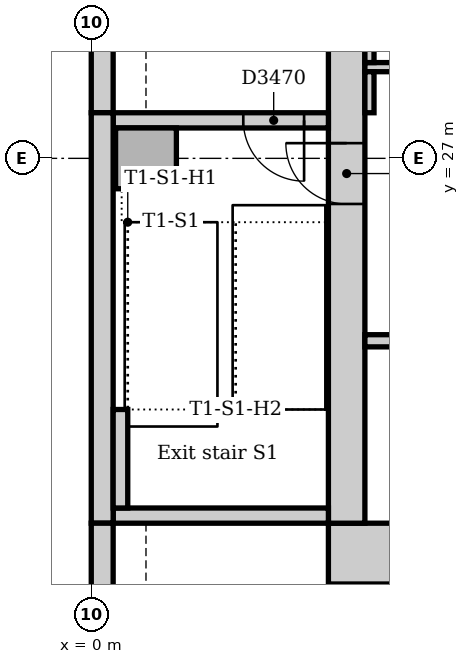
"""IFC4 building model, lengths in metres.
Left out: names, types, materials, properties, quantities, classifications, styles, units other than length and angle.
Written with IfcOpenShell. Run it as: python <this file> out.ifc"""

import sys

from ifc_helpers import new_model, si_unit, direction, frame, frame_2d, origin, origin_2d, place, context, subcontext, project, spatial, rectangle, extrude, element, fill, save


model = new_model("IFC4")
c1 = context("Model", 3, precision=1e-05, world=origin(), true_north=direction((0.0, 1.0)))
c2 = subcontext(c1, "Body", "Model", "MODEL_VIEW")
j1 = project(units=[si_unit("LENGTHUNIT", "METRE"), si_unit("PLANEANGLEUNIT", "RADIAN")], contexts=[c1])
p1 = place(None, origin())
s1 = spatial("IfcSite", under=j1, at=p1, CompositionType="ELEMENT")
p2 = place(p1, origin())
s2 = spatial("IfcBuilding", under=s1, at=p2, CompositionType="ELEMENT")
p3 = place(p2, frame((0.0, 0.0, 55.0)))
s3 = spatial("IfcBuildingStorey", under=s2, at=p3, CompositionType="ELEMENT", Elevation=55.0)
p4 = place(p3, frame((3.9, 20.5, 0.0), z_axis=(0.0, 0.0, 1.0), x_axis=(1.0, 0.0, 0.0)))
e1 = element("IfcWall", 1, at=p4, inside=s3, PredefinedType="SOLIDWALL", context=c2, shape_type="SweptSolid", body=[
    extrude(rectangle(XDim=19.6, YDim=1.0, at=frame_2d((9.8, 0.0))), origin(), (0.0, 0.0, 1.0), 4.0),
])
p5 = place(p3, frame((4.2, 31.5, 0.0), z_axis=(0.0, 0.0, 1.0), x_axis=(0.0, -1.0, 0.0)))
e2 = element("IfcWall", 2, at=p5, inside=s3, PredefinedType="SOLIDWALL", context=c2, shape_type="SweptSolid", body=[
    extrude(rectangle(XDim=10.5, YDim=0.6, at=frame_2d((5.25, 0.0))), origin(), (0.0, 0.0, 1.0), 4.0),
])
p6 = place(p5, frame((4.25, 0.0, 0.0)))
e3 = element("IfcOpeningElement", 3, at=p6, cuts=e2, PredefinedType="OPENING", context=c2, shape_type="SweptSolid", body=[
    extrude(rectangle(XDim=1.0, YDim=2.1, at=frame_2d((0.5, 1.05))), frame((0.0, 0.31, 0.0), z_axis=(0.0, -1.0, 0.0), x_axis=(1.0, 0.0, 0.0)), (0.0, 0.0, 1.0), 0.62),
])
p7 = place(p3, frame((0.36, 21.125, 0.0), z_axis=(0.0, 0.0, 1.0), x_axis=(1.0, 0.0, 0.0)))
e4 = element("IfcWall", 4, at=p7, inside=s3, PredefinedType="SOLIDWALL", context=c2, shape_type="SweptSolid", body=[
    extrude(rectangle(XDim=3.54, YDim=0.25, at=frame_2d((1.77, 0.0))), origin(), (0.0, 0.0, 1.0), 4.0),
])
p8 = place(p3, frame((3.9, 27.625, 0.0), z_axis=(0.0, 0.0, 1.0), x_axis=(-1.0, 0.0, 0.0)))
e5 = element("IfcWall", 5, at=p8, inside=s3, PredefinedType="SOLIDWALL", context=c2, shape_type="SweptSolid", body=[
    extrude(rectangle(XDim=3.54, YDim=0.25, at=frame_2d((1.77, 0.0))), origin(), (0.0, 0.0, 1.0), 4.0),
])
p9 = place(p8, frame((0.4, 0.0, 0.0)))
e6 = element("IfcOpeningElement", 6, at=p9, cuts=e5, PredefinedType="OPENING", context=c2, shape_type="SweptSolid", body=[
    extrude(rectangle(XDim=1.0, YDim=2.1, at=frame_2d((0.5, 1.05))), frame((0.0, 0.135, 0.0), z_axis=(0.0, -1.0, 0.0), x_axis=(1.0, 0.0, 0.0)), (0.0, 0.0, 1.0), 0.27),
])
p10 = place(p3, frame((0.9, 27.0, 0.0), z_axis=(0.0, 0.0, 1.0), x_axis=(1.0, 0.0, 0.0)))
e7 = element("IfcColumn", 7, at=p10, inside=s3, PredefinedType="COLUMN", context=c2, shape_type="SweptSolid", body=[
    extrude(rectangle(XDim=1.0, YDim=1.0, at=origin_2d()), origin(), (0.0, 0.0, 1.0), 4.0),
])
p11 = place(p3, frame((0.18, 35.25, 0.0), z_axis=(0.0, 0.0, 1.0), x_axis=(0.0, -1.0, 0.0)))
e8 = element("IfcWall", 8, at=p11, inside=s3, PredefinedType="STANDARD", context=c2, shape_type="SweptSolid", body=[
    extrude(rectangle(XDim=7.5, YDim=0.36, at=frame_2d((3.75, 0.0))), origin(), (0.0, 0.0, 1.0), 3.85),
])
p12 = place(p3, frame((0.18, 27.75, 0.0), z_axis=(0.0, 0.0, 1.0), x_axis=(0.0, -1.0, 0.0)))
e9 = element("IfcWall", 9, at=p12, inside=s3, PredefinedType="STANDARD", context=c2, shape_type="SweptSolid", body=[
    extrude(rectangle(XDim=6.75, YDim=0.36, at=frame_2d((3.375, 0.0))), origin(), (0.0, 0.0, 1.0), 3.85),
])
p13 = place(p3, frame((0.18, 21.0, 0.0), z_axis=(0.0, 0.0, 1.0), x_axis=(0.0, -1.0, 0.0)))
e10 = element("IfcWall", 10, at=p13, inside=s3, PredefinedType="STANDARD", context=c2, shape_type="SweptSolid", body=[
    extrude(rectangle(XDim=16.757, YDim=0.36, at=frame_2d((8.379, 0.0))), origin(), (0.0, 0.0, 1.0), 3.85),
])
p14 = place(p13, frame((1.35, 0.0, 0.9)))
e11 = element("IfcOpeningElement", 11, at=p14, cuts=e10, PredefinedType="OPENING", context=c2, shape_type="SweptSolid", body=[
    extrude(rectangle(XDim=3.3, YDim=1.6, at=frame_2d((1.65, 0.8))), frame((0.0, 0.19, 0.0), z_axis=(0.0, -1.0, 0.0), x_axis=(1.0, 0.0, 0.0)), (0.0, 0.0, 1.0), 0.38),
])
p15 = place(p13, frame((5.85, 0.0, 0.9)))
e12 = element("IfcOpeningElement", 12, at=p15, cuts=e10, PredefinedType="OPENING", context=c2, shape_type="SweptSolid", body=[
    extrude(rectangle(XDim=3.3, YDim=1.6, at=frame_2d((1.65, 0.8))), frame((0.0, 0.19, 0.0), z_axis=(0.0, -1.0, 0.0), x_axis=(1.0, 0.0, 0.0)), (0.0, 0.0, 1.0), 0.38),
])
p16 = place(p13, frame((10.35, 0.0, 0.9)))
e13 = element("IfcOpeningElement", 13, at=p16, cuts=e10, PredefinedType="OPENING", context=c2, shape_type="SweptSolid", body=[
    extrude(rectangle(XDim=3.3, YDim=1.6, at=frame_2d((1.65, 0.8))), frame((0.0, 0.19, 0.0), z_axis=(0.0, -1.0, 0.0), x_axis=(1.0, 0.0, 0.0)), (0.0, 0.0, 1.0), 0.38),
])
p17 = place(p3, frame((0.48, 21.25, 0.0), z_axis=(0.0, 0.0, 1.0), x_axis=(0.0, 1.0, 0.0)))
e14 = element("IfcWall", 14, at=p17, inside=s3, PredefinedType="STANDARD", context=c2, shape_type="SweptSolid", body=[
    extrude(rectangle(XDim=1.62, YDim=0.24, at=frame_2d((0.81, 0.0))), origin(), (0.0, 0.0, 1.0), 4.0),
])
p18 = place(p3, frame((4.5, 24.0, 0.0), z_axis=(0.0, 0.0, 1.0), x_axis=(1.0, 0.0, 0.0)))
e15 = element("IfcWall", 15, at=p18, inside=s3, PredefinedType="PARTITIONING", context=c2, shape_type="SweptSolid", body=[
    extrude(rectangle(XDim=18.0, YDim=0.2, at=frame_2d((9.0, 0.0))), origin(), (0.0, 0.0, 1.0), 3.85),
])
p19 = place(p18, frame((0.95, 0.0, 0.0)))
e16 = element("IfcOpeningElement", 16, at=p19, cuts=e15, PredefinedType="OPENING", context=c2, shape_type="SweptSolid", body=[
    extrude(rectangle(XDim=1.1, YDim=2.1, at=frame_2d((0.55, 1.05))), frame((0.0, 0.11, 0.0), z_axis=(0.0, -1.0, 0.0), x_axis=(1.0, 0.0, 0.0)), (0.0, 0.0, 1.0), 0.22),
])
p20 = place(p18, frame((3.95, 0.0, 0.0)))
e17 = element("IfcOpeningElement", 17, at=p20, cuts=e15, PredefinedType="OPENING", context=c2, shape_type="SweptSolid", body=[
    extrude(rectangle(XDim=1.1, YDim=2.1, at=frame_2d((0.55, 1.05))), frame((0.0, 0.11, 0.0), z_axis=(0.0, -1.0, 0.0), x_axis=(1.0, 0.0, 0.0)), (0.0, 0.0, 1.0), 0.22),
])
p21 = place(p18, frame((6.95, 0.0, 0.0)))
e18 = element("IfcOpeningElement", 18, at=p21, cuts=e15, PredefinedType="OPENING", context=c2, shape_type="SweptSolid", body=[
    extrude(rectangle(XDim=1.1, YDim=2.1, at=frame_2d((0.55, 1.05))), frame((0.0, 0.11, 0.0), z_axis=(0.0, -1.0, 0.0), x_axis=(1.0, 0.0, 0.0)), (0.0, 0.0, 1.0), 0.22),
])
p22 = place(p18, frame((9.95, 0.0, 0.0)))
e19 = element("IfcOpeningElement", 19, at=p22, cuts=e15, PredefinedType="OPENING", context=c2, shape_type="SweptSolid", body=[
    extrude(rectangle(XDim=1.1, YDim=2.1, at=frame_2d((0.55, 1.05))), frame((0.0, 0.11, 0.0), z_axis=(0.0, -1.0, 0.0), x_axis=(1.0, 0.0, 0.0)), (0.0, 0.0, 1.0), 0.22),
])
p23 = place(p18, frame((12.95, 0.0, 0.0)))
e20 = element("IfcOpeningElement", 20, at=p23, cuts=e15, PredefinedType="OPENING", context=c2, shape_type="SweptSolid", body=[
    extrude(rectangle(XDim=1.1, YDim=2.1, at=frame_2d((0.55, 1.05))), frame((0.0, 0.11, 0.0), z_axis=(0.0, -1.0, 0.0), x_axis=(1.0, 0.0, 0.0)), (0.0, 0.0, 1.0), 0.22),
])
p24 = place(p18, frame((15.95, 0.0, 0.0)))
e21 = element("IfcOpeningElement", 21, at=p24, cuts=e15, PredefinedType="OPENING", context=c2, shape_type="SweptSolid", body=[
    extrude(rectangle(XDim=1.1, YDim=2.1, at=frame_2d((0.55, 1.05))), frame((0.0, 0.11, 0.0), z_axis=(0.0, -1.0, 0.0), x_axis=(1.0, 0.0, 0.0)), (0.0, 0.0, 1.0), 0.22),
])
p25 = place(p3, frame((4.5, 28.5, 0.0), z_axis=(0.0, 0.0, 1.0), x_axis=(1.0, 0.0, 0.0)))
e22 = element("IfcWall", 22, at=p25, inside=s3, PredefinedType="PARTITIONING", context=c2, shape_type="SweptSolid", body=[
    extrude(rectangle(XDim=18.0, YDim=0.15, at=frame_2d((9.0, 0.0))), origin(), (0.0, 0.0, 1.0), 3.85),
])
p26 = place(p25, frame((2.6, 0.0, 0.0)))
e23 = element("IfcOpeningElement", 23, at=p26, cuts=e22, PredefinedType="OPENING", context=c2, shape_type="SweptSolid", body=[
    extrude(rectangle(XDim=0.9, YDim=2.1, at=frame_2d((0.45, 1.05))), frame((0.0, 0.085, 0.0), z_axis=(0.0, -1.0, 0.0), x_axis=(1.0, 0.0, 0.0)), (0.0, 0.0, 1.0), 0.17),
])
p27 = place(p25, frame((7.8, 0.0, 0.0)))
e24 = element("IfcOpeningElement", 24, at=p27, cuts=e22, PredefinedType="OPENING", context=c2, shape_type="SweptSolid", body=[
    extrude(rectangle(XDim=0.9, YDim=2.1, at=frame_2d((0.45, 1.05))), frame((0.0, 0.085, 0.0), z_axis=(0.0, -1.0, 0.0), x_axis=(1.0, 0.0, 0.0)), (0.0, 0.0, 1.0), 0.17),
])
p28 = place(p25, frame((13.7, 0.0, 0.0)))
e25 = element("IfcOpeningElement", 25, at=p28, cuts=e22, PredefinedType="OPENING", context=c2, shape_type="SweptSolid", body=[
    extrude(rectangle(XDim=0.9, YDim=2.1, at=frame_2d((0.45, 1.05))), frame((0.0, 0.085, 0.0), z_axis=(0.0, -1.0, 0.0), x_axis=(1.0, 0.0, 0.0)), (0.0, 0.0, 1.0), 0.17),
])
p29 = place(p3, frame((4.575, 27.75, 0.0), z_axis=(0.0, 0.0, 1.0), x_axis=(0.0, 1.0, 0.0)))
e26 = element("IfcWall", 26, at=p29, inside=s3, PredefinedType="PARTITIONING", context=c2, shape_type="SweptSolid", body=[
    extrude(rectangle(XDim=0.675, YDim=0.15, at=frame_2d((0.338, 0.0))), origin(), (0.0, 0.0, 1.0), 3.85),
])
p30 = place(p3, frame((4.575, 28.575, 0.0), z_axis=(0.0, 0.0, 1.0), x_axis=(0.0, 1.0, 0.0)))
e27 = element("IfcWall", 27, at=p30, inside=s3, PredefinedType="PARTITIONING", context=c2, shape_type="SweptSolid", body=[
    extrude(rectangle(XDim=2.675, YDim=0.15, at=frame_2d((1.337, 0.0))), origin(), (0.0, 0.0, 1.0), 3.85),
])
p31 = place(p6, frame((1.0, 0.0, 0.0), z_axis=(0.0, 0.0, 1.0), x_axis=(-1.0, 0.0, 0.0)))
e28 = element("IfcDoor", 28, at=p31, inside=s3, OperationType="SINGLE_SWING_RIGHT", PredefinedType="DOOR", context=c2, shape_type="SweptSolid", body=[
    extrude(rectangle(XDim=1.0, YDim=2.1, at=frame_2d((0.5, 1.05))), frame((0.0, 0.025, 0.0), z_axis=(0.0, -1.0, 0.0), x_axis=(1.0, 0.0, 0.0)), (0.0, 0.0, 1.0), 0.05),
])
fill(e3, e28)
p32 = place(p9, origin())
e29 = element("IfcDoor", 29, at=p32, inside=s3, OperationType="SINGLE_SWING_LEFT", PredefinedType="DOOR", context=c2, shape_type="SweptSolid", body=[
    extrude(rectangle(XDim=1.0, YDim=2.1, at=frame_2d((0.5, 1.05))), frame((0.0, 0.025, 0.0), z_axis=(0.0, -1.0, 0.0), x_axis=(1.0, 0.0, 0.0)), (0.0, 0.0, 1.0), 0.05),
])
fill(e6, e29)
save(model, sys.argv[1])
